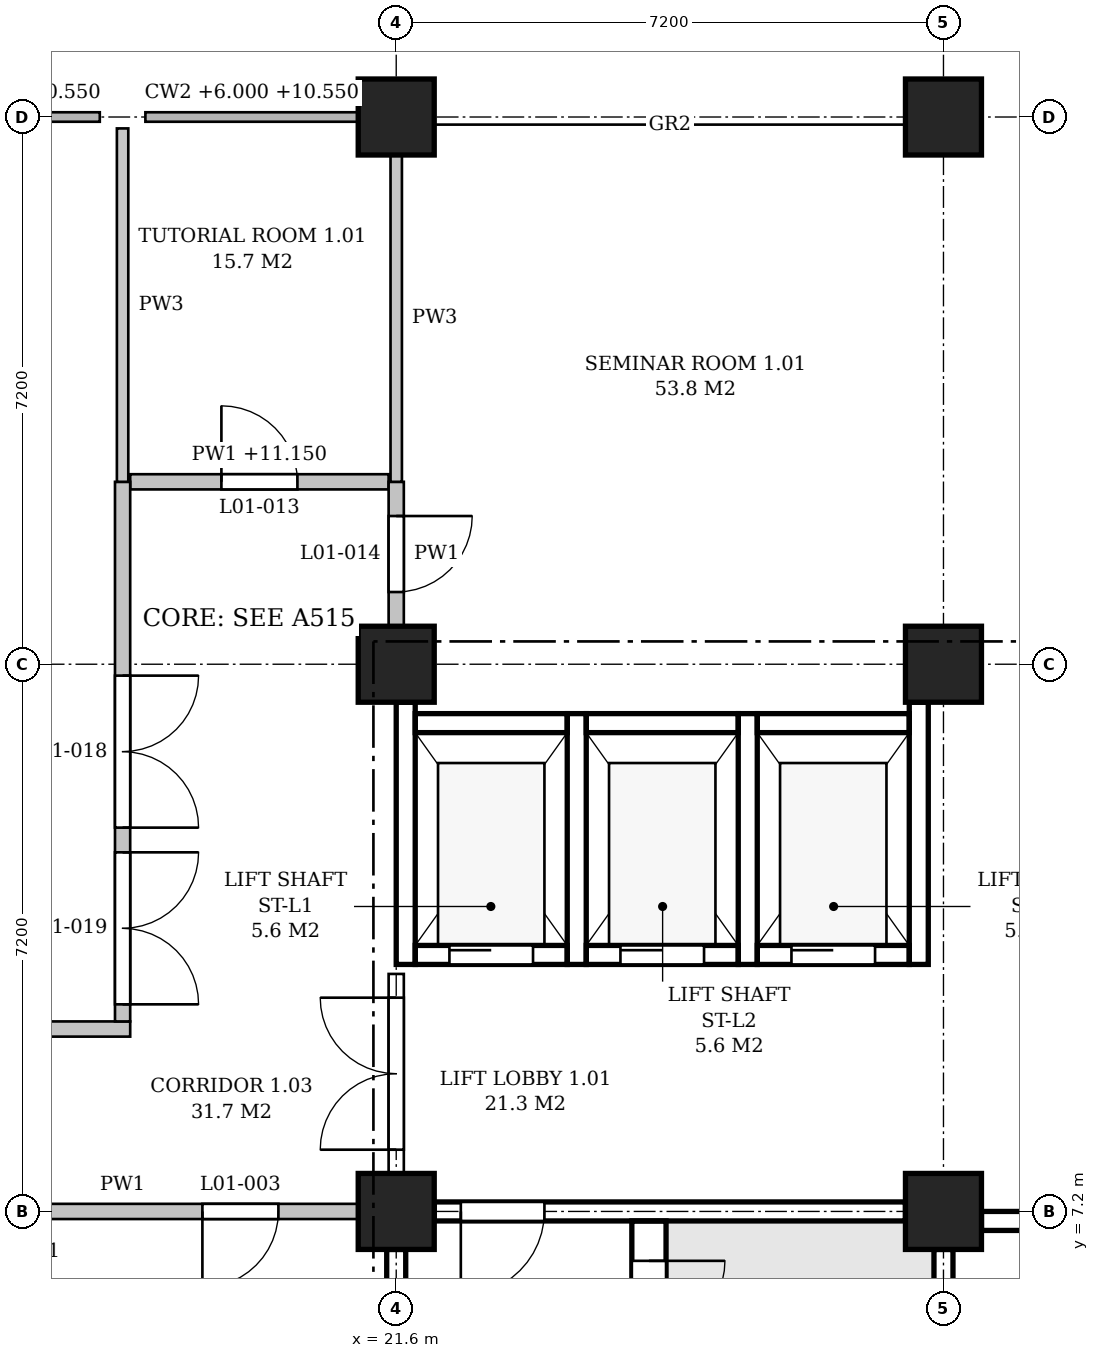
"""IFC4 building model, lengths in metres.
Left out: names, types, materials, properties, quantities, classifications, styles, units other than length and angle.
Written with IfcOpenShell. Run it as: python <this file> out.ifc"""

import sys

from ifc_helpers import new_model, si_unit, direction, frame, frame_2d, origin, origin_2d, place, context, subcontext, project, spatial, polyline, rectangle, outline, extrude, element, fill, save


model = new_model("IFC4")
c1 = context("Model", 3, precision=1e-05, world=origin(), true_north=direction((0.0, 1.0)))
c2 = subcontext(c1, "Body", "Model", "MODEL_VIEW")
j1 = project(units=[si_unit("LENGTHUNIT", "METRE"), si_unit("PLANEANGLEUNIT", "RADIAN")], contexts=[c1])
p1 = place(None, origin())
s1 = spatial("IfcSite", under=j1, at=p1, CompositionType="ELEMENT")
p2 = place(p1, origin())
s2 = spatial("IfcBuilding", under=s1, at=p2, CompositionType="ELEMENT")
p3 = place(p2, frame((0.0, 0.0, 6.0)))
s3 = spatial("IfcBuildingStorey", under=s2, at=p3, CompositionType="ELEMENT", Elevation=6.0)
for number, where, z_axis, x_axis in (
    (1, (21.6, 7.2, 0.0), (0.0, 0.0, 1.0), (1.0, 0.0, 0.0)),
    (2, (21.6, 14.4, 0.0), (0.0, 0.0, 1.0), (1.0, 0.0, 0.0)),
    (3, (21.6, 21.6, 0.0), (0.0, 0.0, 1.0), (1.0, 0.0, 0.0)),
    (4, (28.8, 7.2, 0.0), (0.0, 0.0, 1.0), (1.0, 0.0, 0.0)),
    (5, (28.8, 14.4, 0.0), (0.0, 0.0, 1.0), (1.0, 0.0, 0.0)),
    (6, (28.8, 21.6, 0.0), (0.0, 0.0, 1.0), (1.0, 0.0, 0.0)),
):
    element("IfcColumn", number, at=place(p3, frame(where, z_axis=z_axis, x_axis=x_axis)), inside=s3, PredefinedType="COLUMN", context=c2, shape_type="SweptSolid", body=[
        extrude(rectangle(XDim=1.0, YDim=1.0, at=origin_2d()), origin(), (0.0, 0.0, 1.0), 5.4),
    ])
p4 = place(p3, frame((29.3, 7.075, 0.0), z_axis=(0.0, 0.0, 1.0), x_axis=(1.0, 0.0, 0.0)))
e7 = element("IfcWall", 7, at=p4, inside=s3, PredefinedType="SHEAR", context=c2, shape_type="SweptSolid", body=[
    extrude(rectangle(XDim=6.275, YDim=0.25, at=frame_2d((3.137, 0.0))), origin(), (0.0, 0.0, 1.0), 4.7),
])
p5 = place(p3, frame((28.8, 0.5, -0.25), z_axis=(0.0, 0.0, 1.0), x_axis=(0.0, 1.0, 0.0)))
e8 = element("IfcWall", 8, at=p5, inside=s3, PredefinedType="SHEAR", context=c2, shape_type="SweptSolid", body=[
    extrude(rectangle(XDim=6.2, YDim=0.25, at=frame_2d((3.1, 0.0))), origin(), (0.0, 0.0, 1.0), 4.8),
])
p6 = place(p3, frame((22.1, 7.2, 0.0), z_axis=(0.0, 0.0, 1.0), x_axis=(1.0, 0.0, 0.0)))
e9 = element("IfcWall", 9, at=p6, inside=s3, PredefinedType="SHEAR", context=c2, shape_type="SweptSolid", body=[
    extrude(rectangle(XDim=6.2, YDim=0.25, at=frame_2d((3.1, 0.0))), origin(), (0.0, 0.0, 1.0), 4.4),
])
p7 = place(p6, frame((0.35, 0.0, 0.0)))
e10 = element("IfcOpeningElement", 10, at=p7, cuts=e9, PredefinedType="OPENING", context=c2, shape_type="SweptSolid", body=[
    extrude(rectangle(XDim=1.1, YDim=2.1, at=frame_2d((0.55, 1.05))), frame((0.0, 0.135, 0.0), z_axis=(0.0, -1.0, 0.0), x_axis=(1.0, 0.0, 0.0)), (0.0, 0.0, 1.0), 0.27),
])
p8 = place(p3, frame((21.6, 0.5, 0.0), z_axis=(0.0, 0.0, 1.0), x_axis=(0.0, 1.0, 0.0)))
e11 = element("IfcWall", 11, at=p8, inside=s3, PredefinedType="SHEAR", context=c2, shape_type="SweptSolid", body=[
    extrude(rectangle(XDim=6.2, YDim=0.25, at=frame_2d((3.1, 0.0))), origin(), (0.0, 0.0, 1.0), 4.4),
])
p9 = place(p3, frame((24.925, 0.15, 0.0), z_axis=(0.0, 0.0, 1.0), x_axis=(0.0, 1.0, 0.0)))
e12 = element("IfcWall", 12, at=p9, inside=s3, PredefinedType="SHEAR", context=c2, shape_type="SweptSolid", body=[
    extrude(rectangle(XDim=6.925, YDim=0.45, at=frame_2d((3.462, 0.0))), origin(), (0.0, 0.0, 1.0), 5.15),
])
p10 = place(p9, frame((5.4, 0.0, 0.0)))
e13 = element("IfcOpeningElement", 13, at=p10, cuts=e12, PredefinedType="OPENING", context=c2, shape_type="SweptSolid", body=[
    extrude(rectangle(XDim=1.0, YDim=2.1, at=frame_2d((0.5, 1.05))), frame((0.0, 0.235, 0.0), z_axis=(0.0, -1.0, 0.0), x_axis=(1.0, 0.0, 0.0)), (0.0, 0.0, 1.0), 0.47),
])
p11 = place(p3, frame((21.725, 10.45, -0.25), z_axis=(0.0, 0.0, 1.0), x_axis=(0.0, 1.0, 0.0)))
e14 = element("IfcWall", 14, at=p11, inside=s3, PredefinedType="SHEAR", context=c2, shape_type="SweptSolid", body=[
    extrude(rectangle(XDim=3.45, YDim=0.25, at=frame_2d((1.725, 0.0))), origin(), (0.0, 0.0, 1.0), 4.65),
])
for number, where, z_axis, x_axis in (
    (15, (23.975, 10.45, -0.25), (0.0, 0.0, 1.0), (0.0, 1.0, 0.0)),
    (16, (26.225, 10.45, -0.25), (0.0, 0.0, 1.0), (0.0, 1.0, 0.0)),
):
    element("IfcWall", number, at=place(p3, frame(where, z_axis=z_axis, x_axis=x_axis)), inside=s3, PredefinedType="SHEAR", context=c2, shape_type="SweptSolid", body=[
        extrude(rectangle(XDim=3.3, YDim=0.25, at=frame_2d((1.65, 0.0))), origin(), (0.0, 0.0, 1.0), 5.4),
    ])
p12 = place(p3, frame((28.475, 10.45, -0.25), z_axis=(0.0, 0.0, 1.0), x_axis=(0.0, 1.0, 0.0)))
e17 = element("IfcWall", 17, at=p12, inside=s3, PredefinedType="SHEAR", context=c2, shape_type="SweptSolid", body=[
    extrude(rectangle(XDim=3.45, YDim=0.25, at=frame_2d((1.725, 0.0))), origin(), (0.0, 0.0, 1.0), 5.4),
])
p13 = place(p3, frame((21.85, 10.575, -0.25), z_axis=(0.0, 0.0, 1.0), x_axis=(1.0, 0.0, 0.0)))
e18 = element("IfcWall", 18, at=p13, inside=s3, PredefinedType="SHEAR", context=c2, shape_type="SweptSolid", body=[
    extrude(rectangle(XDim=2.0, YDim=0.25, at=frame_2d((1.0, 0.0))), origin(), (0.0, 0.0, 1.0), 5.4),
])
p14 = place(p13, frame((0.45, 0.0, 0.25)))
e19 = element("IfcOpeningElement", 19, at=p14, cuts=e18, PredefinedType="OPENING", context=c2, shape_type="SweptSolid", body=[
    extrude(rectangle(XDim=1.1, YDim=2.1, at=frame_2d((0.55, 1.05))), frame((0.0, 0.135, 0.0), z_axis=(0.0, -1.0, 0.0), x_axis=(1.0, 0.0, 0.0)), (0.0, 0.0, 1.0), 0.27),
])
p15 = place(p3, frame((21.85, 13.625, -0.25), z_axis=(0.0, 0.0, 1.0), x_axis=(1.0, 0.0, 0.0)))
e20 = element("IfcWall", 20, at=p15, inside=s3, PredefinedType="SHEAR", context=c2, shape_type="SweptSolid", body=[
    extrude(rectangle(XDim=2.0, YDim=0.25, at=frame_2d((1.0, 0.0))), origin(), (0.0, 0.0, 1.0), 5.4),
])
p16 = place(p3, frame((24.1, 10.575, -0.25), z_axis=(0.0, 0.0, 1.0), x_axis=(1.0, 0.0, 0.0)))
e21 = element("IfcWall", 21, at=p16, inside=s3, PredefinedType="SHEAR", context=c2, shape_type="SweptSolid", body=[
    extrude(rectangle(XDim=2.0, YDim=0.25, at=frame_2d((1.0, 0.0))), origin(), (0.0, 0.0, 1.0), 5.4),
])
p17 = place(p16, frame((0.45, 0.0, 0.25)))
e22 = element("IfcOpeningElement", 22, at=p17, cuts=e21, PredefinedType="OPENING", context=c2, shape_type="SweptSolid", body=[
    extrude(rectangle(XDim=1.1, YDim=2.1, at=frame_2d((0.55, 1.05))), frame((0.0, 0.135, 0.0), z_axis=(0.0, -1.0, 0.0), x_axis=(1.0, 0.0, 0.0)), (0.0, 0.0, 1.0), 0.27),
])
p18 = place(p3, frame((24.1, 13.625, -0.25), z_axis=(0.0, 0.0, 1.0), x_axis=(1.0, 0.0, 0.0)))
e23 = element("IfcWall", 23, at=p18, inside=s3, PredefinedType="SHEAR", context=c2, shape_type="SweptSolid", body=[
    extrude(rectangle(XDim=2.0, YDim=0.25, at=frame_2d((1.0, 0.0))), origin(), (0.0, 0.0, 1.0), 5.4),
])
p19 = place(p3, frame((26.35, 10.575, -0.25), z_axis=(0.0, 0.0, 1.0), x_axis=(1.0, 0.0, 0.0)))
e24 = element("IfcWall", 24, at=p19, inside=s3, PredefinedType="SHEAR", context=c2, shape_type="SweptSolid", body=[
    extrude(rectangle(XDim=2.0, YDim=0.25, at=frame_2d((1.0, 0.0))), origin(), (0.0, 0.0, 1.0), 5.4),
])
p20 = place(p19, frame((0.45, 0.0, 0.25)))
e25 = element("IfcOpeningElement", 25, at=p20, cuts=e24, PredefinedType="OPENING", context=c2, shape_type="SweptSolid", body=[
    extrude(rectangle(XDim=1.1, YDim=2.1, at=frame_2d((0.55, 1.05))), frame((0.0, 0.135, 0.0), z_axis=(0.0, -1.0, 0.0), x_axis=(1.0, 0.0, 0.0)), (0.0, 0.0, 1.0), 0.27),
])
p21 = place(p3, frame((26.35, 13.625, -0.25), z_axis=(0.0, 0.0, 1.0), x_axis=(1.0, 0.0, 0.0)))
e26 = element("IfcWall", 26, at=p21, inside=s3, PredefinedType="SHEAR", context=c2, shape_type="SweptSolid", body=[
    extrude(rectangle(XDim=2.0, YDim=0.25, at=frame_2d((1.0, 0.0))), origin(), (0.0, 0.0, 1.0), 5.4),
])
p22 = place(p2, origin())
s4 = spatial("IfcBuildingStorey", under=s2, at=p22, CompositionType="ELEMENT", Elevation=0.0)
for number, where, z_axis, x_axis in (
    (27, (29.3, 7.4, 0.0), (0.0, 0.0, 1.0), (1.0, 0.0, 0.0)),
    (28, (29.3, 21.4, 0.0), (0.0, 0.0, 1.0), (1.0, 0.0, 0.0)),
):
    element("IfcWall", number, at=place(p22, frame(where, z_axis=z_axis, x_axis=x_axis)), inside=s4, PredefinedType="SOLIDWALL", context=c2, shape_type="SweptSolid", body=[
        extrude(rectangle(XDim=6.275, YDim=0.4, at=frame_2d((3.137, 0.0))), origin(), (0.0, 0.0, 1.0), 10.7),
    ])
p23 = place(p22, frame((29.0, 7.7, 0.0), z_axis=(0.0, 0.0, 1.0), x_axis=(0.0, 1.0, 0.0)))
e29 = element("IfcWall", 29, at=p23, inside=s4, PredefinedType="SOLIDWALL", context=c2, shape_type="SweptSolid", body=[
    extrude(rectangle(XDim=6.2, YDim=0.4, at=frame_2d((3.1, 0.0))), origin(), (0.0, 0.0, 1.0), 10.55),
])
p24 = place(p22, frame((29.0, 14.9, 0.0), z_axis=(0.0, 0.0, 1.0), x_axis=(0.0, 1.0, 0.0)))
e30 = element("IfcWall", 30, at=p24, inside=s4, PredefinedType="SOLIDWALL", context=c2, shape_type="SweptSolid", body=[
    extrude(rectangle(XDim=6.2, YDim=0.4, at=frame_2d((3.1, 0.0))), origin(), (0.0, 0.0, 1.0), 10.55),
])
p25 = place(p3, frame((14.9, 7.2, 0.0), z_axis=(0.0, 0.0, 1.0), x_axis=(1.0, 0.0, 0.0)))
e31 = element("IfcWall", 31, at=p25, inside=s3, PredefinedType="PARTITIONING", context=c2, shape_type="SweptSolid", body=[
    extrude(rectangle(XDim=6.2, YDim=0.2, at=frame_2d((3.1, 0.0))), origin(), (0.0, 0.0, 1.0), 4.4),
])
p26 = place(p25, frame((4.15, 0.0, 0.0)))
e32 = element("IfcOpeningElement", 32, at=p26, cuts=e31, PredefinedType="OPENING", context=c2, shape_type="SweptSolid", body=[
    extrude(rectangle(XDim=1.0, YDim=2.1, at=frame_2d((0.5, 1.05))), frame((0.0, 0.11, 0.0), z_axis=(0.0, -1.0, 0.0), x_axis=(1.0, 0.0, 0.0)), (0.0, 0.0, 1.0), 0.22),
])
p27 = place(p3, frame((3.5, 9.6, 0.0), z_axis=(0.0, 0.0, 1.0), x_axis=(1.0, 0.0, 0.0)))
e33 = element("IfcWall", 33, at=p27, inside=s3, PredefinedType="PARTITIONING", context=c2, shape_type="SweptSolid", body=[
    extrude(outline(polyline([(0.0, 0.0), (14.6, 0.0), (14.6, 5.15), (11.15, 5.15), (11.15, 4.4), (10.65, 4.4), (10.65, 5.15), (3.95, 5.15), (3.95, 4.4), (3.45, 4.4), (3.45, 5.15), (0.0, 5.15), (0.0, 0.0)])), frame((0.0, 0.1, 0.0), z_axis=(0.0, -1.0, 0.0), x_axis=(1.0, 0.0, 0.0)), (0.0, 0.0, 1.0), 0.2),
])
p28 = place(p27, frame((1.4, 0.0, 0.0)))
e34 = element("IfcOpeningElement", 34, at=p28, cuts=e33, PredefinedType="OPENING", context=c2, shape_type="SweptSolid", body=[
    extrude(rectangle(XDim=1.0, YDim=2.1, at=frame_2d((0.5, 1.05))), frame((0.0, 0.11, 0.0), z_axis=(0.0, -1.0, 0.0), x_axis=(1.0, 0.0, 0.0)), (0.0, 0.0, 1.0), 0.22),
])
p29 = place(p27, frame((5.0, 0.0, 0.0)))
e35 = element("IfcOpeningElement", 35, at=p29, cuts=e33, PredefinedType="OPENING", context=c2, shape_type="SweptSolid", body=[
    extrude(rectangle(XDim=1.0, YDim=2.1, at=frame_2d((0.5, 1.05))), frame((0.0, 0.11, 0.0), z_axis=(0.0, -1.0, 0.0), x_axis=(1.0, 0.0, 0.0)), (0.0, 0.0, 1.0), 0.22),
])
p30 = place(p3, frame((18.1, 16.8, 0.0), z_axis=(0.0, 0.0, 1.0), x_axis=(1.0, 0.0, 0.0)))
e36 = element("IfcWall", 36, at=p30, inside=s3, PredefinedType="PARTITIONING", context=c2, shape_type="SweptSolid", body=[
    extrude(outline(polyline([(0.0, 0.0), (3.4, 0.0), (3.4, 4.4), (3.25, 4.4), (3.25, 5.15), (0.0, 5.15), (0.0, 0.0)])), frame((0.0, 0.1, 0.0), z_axis=(0.0, -1.0, 0.0), x_axis=(1.0, 0.0, 0.0)), (0.0, 0.0, 1.0), 0.2),
])
p31 = place(p30, frame((1.2, 0.0, 0.0)))
e37 = element("IfcOpeningElement", 37, at=p31, cuts=e36, PredefinedType="OPENING", context=c2, shape_type="SweptSolid", body=[
    extrude(rectangle(XDim=1.0, YDim=2.1, at=frame_2d((0.5, 1.05))), frame((0.0, 0.11, 0.0), z_axis=(0.0, -1.0, 0.0), x_axis=(1.0, 0.0, 0.0)), (0.0, 0.0, 1.0), 0.22),
])
p32 = place(p3, frame((18.0, 9.7, 0.0), z_axis=(0.0, 0.0, 1.0), x_axis=(0.0, 1.0, 0.0)))
e38 = element("IfcWall", 38, at=p32, inside=s3, PredefinedType="PARTITIONING", context=c2, shape_type="SweptSolid", body=[
    extrude(outline(polyline([(0.0, 0.0), (7.1, 0.0), (7.1, 5.15), (4.95, 5.15), (4.95, 4.4), (4.45, 4.4), (4.45, 5.15), (0.0, 5.15), (0.0, 0.0)])), frame((0.0, 0.1, 0.0), z_axis=(0.0, -1.0, 0.0), x_axis=(1.0, 0.0, 0.0)), (0.0, 0.0, 1.0), 0.2),
])
p33 = place(p32, frame((2.55, 0.0, 0.0)))
e39 = element("IfcOpeningElement", 39, at=p33, cuts=e38, PredefinedType="OPENING", context=c2, shape_type="SweptSolid", body=[
    extrude(rectangle(XDim=2.0, YDim=2.1, at=frame_2d((1.0, 1.05))), frame((0.0, 0.11, 0.0), z_axis=(0.0, -1.0, 0.0), x_axis=(1.0, 0.0, 0.0)), (0.0, 0.0, 1.0), 0.22),
])
p34 = place(p32, frame((0.225, 0.0, 0.0)))
e40 = element("IfcOpeningElement", 40, at=p34, cuts=e38, PredefinedType="OPENING", context=c2, shape_type="SweptSolid", body=[
    extrude(rectangle(XDim=2.0, YDim=2.1, at=frame_2d((1.0, 1.05))), frame((0.0, 0.11, 0.0), z_axis=(0.0, -1.0, 0.0), x_axis=(1.0, 0.0, 0.0)), (0.0, 0.0, 1.0), 0.22),
])
p35 = place(p3, frame((18.0, 16.8, 0.0), z_axis=(0.0, 0.0, 1.0), x_axis=(0.0, 1.0, 0.0)))
e41 = element("IfcWall", 41, at=p35, inside=s3, PredefinedType="PARTITIONING", context=c2, shape_type="SweptSolid", body=[
    extrude(rectangle(XDim=4.65, YDim=0.15, at=frame_2d((2.325, 0.0))), origin(), (0.0, 0.0, 1.0), 4.4),
])
p36 = place(p3, frame((21.6, 7.7, 0.0), z_axis=(0.0, 0.0, 1.0), x_axis=(0.0, 1.0, 0.0)))
e42 = element("IfcWall", 42, at=p36, inside=s3, PredefinedType="PARTITIONING", context=c2, shape_type="SweptSolid", body=[
    extrude(rectangle(XDim=2.625, YDim=0.2, at=frame_2d((1.312, 0.0))), origin(), (0.0, 0.0, 1.0), 4.4),
])
p37 = place(p36, frame((0.312, 0.0, 0.0)))
e43 = element("IfcOpeningElement", 43, at=p37, cuts=e42, PredefinedType="OPENING", context=c2, shape_type="SweptSolid", body=[
    extrude(rectangle(XDim=2.0, YDim=2.4, at=frame_2d((1.0, 1.2))), frame((0.0, 0.11, 0.0), z_axis=(0.0, -1.0, 0.0), x_axis=(1.0, 0.0, 0.0)), (0.0, 0.0, 1.0), 0.22),
])
p38 = place(p3, frame((21.6, 14.9, 0.0), z_axis=(0.0, 0.0, 1.0), x_axis=(0.0, 1.0, 0.0)))
e44 = element("IfcWall", 44, at=p38, inside=s3, PredefinedType="PARTITIONING", context=c2, shape_type="SweptSolid", body=[
    extrude(rectangle(XDim=1.9, YDim=0.2, at=frame_2d((0.95, 0.0))), origin(), (0.0, 0.0, 1.0), 4.4),
])
p39 = place(p38, frame((0.45, 0.0, 0.0)))
e45 = element("IfcOpeningElement", 45, at=p39, cuts=e44, PredefinedType="OPENING", context=c2, shape_type="SweptSolid", body=[
    extrude(rectangle(XDim=1.0, YDim=2.1, at=frame_2d((0.5, 1.05))), frame((0.0, 0.11, 0.0), z_axis=(0.0, -1.0, 0.0), x_axis=(1.0, 0.0, 0.0)), (0.0, 0.0, 1.0), 0.22),
])
p40 = place(p3, frame((21.6, 16.8, 0.0), z_axis=(0.0, 0.0, 1.0), x_axis=(0.0, 1.0, 0.0)))
e46 = element("IfcWall", 46, at=p40, inside=s3, PredefinedType="PARTITIONING", context=c2, shape_type="SweptSolid", body=[
    extrude(rectangle(XDim=4.3, YDim=0.15, at=frame_2d((2.15, 0.0))), origin(), (0.0, 0.0, 1.0), 4.4),
])
p41 = place(p10, frame((1.0, 0.0, 0.0), z_axis=(0.0, 0.0, 1.0), x_axis=(-1.0, 0.0, 0.0)))
e47 = element("IfcDoor", 47, at=p41, inside=s3, OperationType="SINGLE_SWING_LEFT", PredefinedType="DOOR", context=c2, shape_type="SweptSolid", body=[
    extrude(rectangle(XDim=1.0, YDim=2.1, at=frame_2d((0.5, 1.05))), frame((0.0, 0.025, 0.0), z_axis=(0.0, -1.0, 0.0), x_axis=(1.0, 0.0, 0.0)), (0.0, 0.0, 1.0), 0.05),
])
fill(e13, e47)
p42 = place(p7, frame((1.1, 0.0, 0.0), z_axis=(0.0, 0.0, 1.0), x_axis=(-1.0, 0.0, 0.0)))
e48 = element("IfcDoor", 48, at=p42, inside=s3, OperationType="SINGLE_SWING_RIGHT", PredefinedType="DOOR", context=c2, shape_type="SweptSolid", body=[
    extrude(rectangle(XDim=1.1, YDim=2.1, at=frame_2d((0.55, 1.05))), frame((0.0, 0.025, 0.0), z_axis=(0.0, -1.0, 0.0), x_axis=(1.0, 0.0, 0.0)), (0.0, 0.0, 1.0), 0.05),
])
fill(e10, e48)
p43 = place(p14, origin())
e49 = element("IfcDoor", 49, at=p43, inside=s3, OperationType="SLIDING_TO_LEFT", PredefinedType="DOOR", context=c2, shape_type="SweptSolid", body=[
    extrude(rectangle(XDim=1.1, YDim=2.1, at=frame_2d((0.55, 1.05))), frame((0.0, 0.025, 0.0), z_axis=(0.0, -1.0, 0.0), x_axis=(1.0, 0.0, 0.0)), (0.0, 0.0, 1.0), 0.05),
])
fill(e19, e49)
p44 = place(p17, origin())
e50 = element("IfcDoor", 50, at=p44, inside=s3, OperationType="SLIDING_TO_LEFT", PredefinedType="DOOR", context=c2, shape_type="SweptSolid", body=[
    extrude(rectangle(XDim=1.1, YDim=2.1, at=frame_2d((0.55, 1.05))), frame((0.0, 0.025, 0.0), z_axis=(0.0, -1.0, 0.0), x_axis=(1.0, 0.0, 0.0)), (0.0, 0.0, 1.0), 0.05),
])
fill(e22, e50)
p45 = place(p20, origin())
e51 = element("IfcDoor", 51, at=p45, inside=s3, OperationType="SLIDING_TO_LEFT", PredefinedType="DOOR", context=c2, shape_type="SweptSolid", body=[
    extrude(rectangle(XDim=1.1, YDim=2.1, at=frame_2d((0.55, 1.05))), frame((0.0, 0.025, 0.0), z_axis=(0.0, -1.0, 0.0), x_axis=(1.0, 0.0, 0.0)), (0.0, 0.0, 1.0), 0.05),
])
fill(e25, e51)
p46 = place(p37, origin())
e52 = element("IfcDoor", 52, at=p46, inside=s3, OperationType="DOUBLE_DOOR_SINGLE_SWING", PredefinedType="DOOR", context=c2, shape_type="SweptSolid", body=[
    extrude(rectangle(XDim=2.0, YDim=2.4, at=frame_2d((1.0, 1.2))), frame((0.0, 0.025, 0.0), z_axis=(0.0, -1.0, 0.0), x_axis=(1.0, 0.0, 0.0)), (0.0, 0.0, 1.0), 0.05),
])
fill(e43, e52)
p47 = place(p26, frame((1.0, 0.0, 0.0), z_axis=(0.0, 0.0, 1.0), x_axis=(-1.0, 0.0, 0.0)))
e53 = element("IfcDoor", 53, at=p47, inside=s3, OperationType="SINGLE_SWING_RIGHT", PredefinedType="DOOR", context=c2, shape_type="SweptSolid", body=[
    extrude(rectangle(XDim=1.0, YDim=2.1, at=frame_2d((0.5, 1.05))), frame((0.0, 0.025, 0.0), z_axis=(0.0, -1.0, 0.0), x_axis=(1.0, 0.0, 0.0)), (0.0, 0.0, 1.0), 0.05),
])
fill(e32, e53)
p48 = place(p31, origin())
e54 = element("IfcDoor", 54, at=p48, inside=s3, OperationType="SINGLE_SWING_LEFT", PredefinedType="DOOR", context=c2, shape_type="SweptSolid", body=[
    extrude(rectangle(XDim=1.0, YDim=2.1, at=frame_2d((0.5, 1.05))), frame((0.0, 0.025, 0.0), z_axis=(0.0, -1.0, 0.0), x_axis=(1.0, 0.0, 0.0)), (0.0, 0.0, 1.0), 0.05),
])
fill(e37, e54)
p49 = place(p39, frame((1.0, 0.0, 0.0), z_axis=(0.0, 0.0, 1.0), x_axis=(-1.0, 0.0, 0.0)))
e55 = element("IfcDoor", 55, at=p49, inside=s3, OperationType="SINGLE_SWING_LEFT", PredefinedType="DOOR", context=c2, shape_type="SweptSolid", body=[
    extrude(rectangle(XDim=1.0, YDim=2.1, at=frame_2d((0.5, 1.05))), frame((0.0, 0.025, 0.0), z_axis=(0.0, -1.0, 0.0), x_axis=(1.0, 0.0, 0.0)), (0.0, 0.0, 1.0), 0.05),
])
fill(e45, e55)
p50 = place(p33, origin())
e56 = element("IfcDoor", 56, at=p50, inside=s3, OperationType="DOUBLE_DOOR_SINGLE_SWING", PredefinedType="DOOR", context=c2, shape_type="SweptSolid", body=[
    extrude(rectangle(XDim=2.0, YDim=2.1, at=frame_2d((1.0, 1.05))), frame((0.0, 0.025, 0.0), z_axis=(0.0, -1.0, 0.0), x_axis=(1.0, 0.0, 0.0)), (0.0, 0.0, 1.0), 0.05),
])
fill(e39, e56)
p51 = place(p34, origin())
e57 = element("IfcDoor", 57, at=p51, inside=s3, OperationType="DOUBLE_DOOR_SINGLE_SWING", PredefinedType="DOOR", context=c2, shape_type="SweptSolid", body=[
    extrude(rectangle(XDim=2.0, YDim=2.1, at=frame_2d((1.0, 1.05))), frame((0.0, 0.025, 0.0), z_axis=(0.0, -1.0, 0.0), x_axis=(1.0, 0.0, 0.0)), (0.0, 0.0, 1.0), 0.05),
])
fill(e40, e57)
save(model, sys.argv[1])
